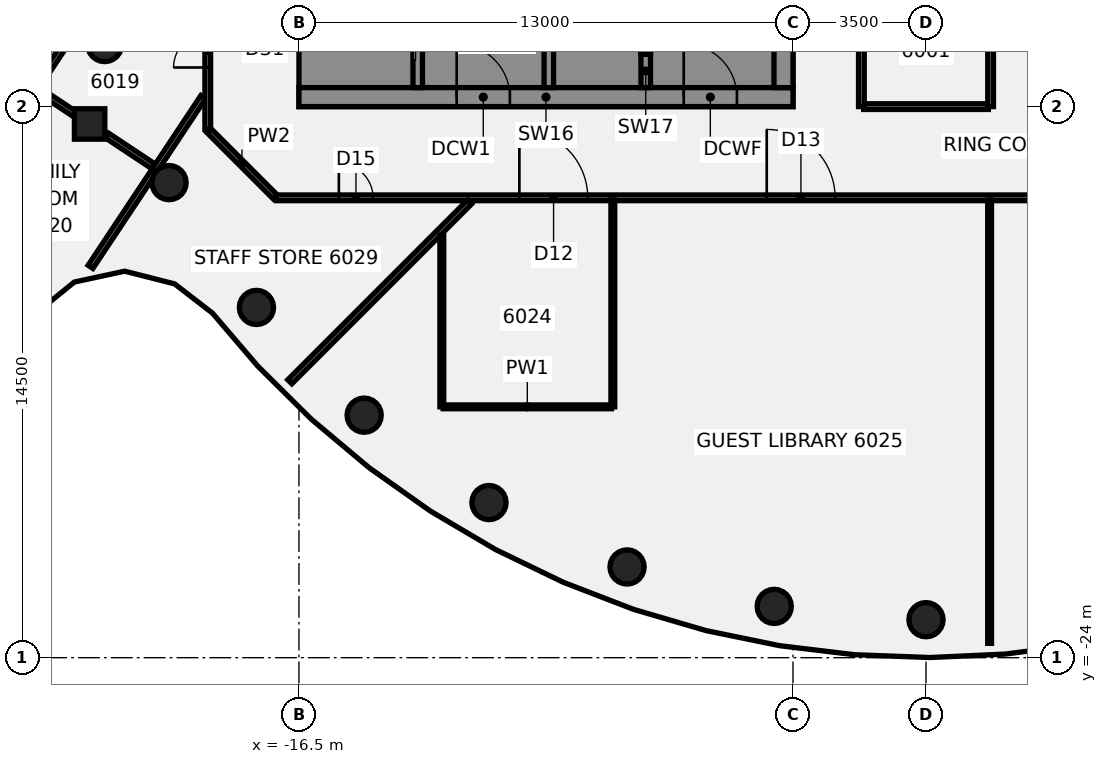
"""IFC4 building model, lengths in metres.
Left out: names, types, materials, properties, quantities, classifications, styles, units other than length and angle.
Written with IfcOpenShell. Run it as: python <this file> out.ifc"""

import sys

from ifc_helpers import new_model, si_unit, direction, frame, frame_2d, origin, origin_2d, place, context, subcontext, project, spatial, polyline, rectangle, circle, outline, extrude, element, fill, save


model = new_model("IFC4")
c1 = context("Model", 3, precision=1e-05, world=origin(), true_north=direction((0.0, 1.0)))
c2 = subcontext(c1, "Body", "Model", "MODEL_VIEW")
j1 = project(units=[si_unit("LENGTHUNIT", "METRE"), si_unit("PLANEANGLEUNIT", "RADIAN")], contexts=[c1])
p1 = place(None, origin())
s1 = spatial("IfcSite", under=j1, at=p1, CompositionType="ELEMENT")
p2 = place(p1, origin())
s2 = spatial("IfcBuilding", under=s1, at=p2, CompositionType="ELEMENT")
p3 = place(p2, frame((0.0, 0.0, 237.9)))
s3 = spatial("IfcBuildingStorey", under=s2, at=p3, CompositionType="ELEMENT", Elevation=237.9)
for number, where, z_axis, x_axis in (
    (1, (-21.613, -7.866, -0.14), (0.0, 0.0, 1.0), (1.0, 0.0, 0.0)),
    (2, (-19.919, -11.5, -0.14), (0.0, 0.0, 1.0), (1.0, 0.0, 0.0)),
    (3, (-17.619, -14.784, -0.14), (0.0, 0.0, 1.0), (1.0, 0.0, 0.0)),
    (4, (-14.784, -17.619, -0.14), (0.0, 0.0, 1.0), (1.0, 0.0, 0.0)),
    (5, (-11.5, -19.919, -0.14), (0.0, 0.0, 1.0), (1.0, 0.0, 0.0)),
    (6, (-7.866, -21.613, -0.14), (0.0, 0.0, 1.0), (1.0, 0.0, 0.0)),
    (7, (-3.994, -22.651, -0.14), (0.0, 0.0, 1.0), (1.0, 0.0, 0.0)),
    (8, (0.0, -23.0, -0.14), (0.0, 0.0, 1.0), (1.0, 0.0, 0.0)),
):
    element("IfcColumn", number, at=place(p3, frame(where, z_axis=z_axis, x_axis=x_axis)), inside=s3, PredefinedType="COLUMN", context=c2, shape_type="SweptSolid", body=[
        extrude(circle(Radius=0.45, at=origin_2d()), origin(), (0.0, 0.0, 1.0), 3.6),
    ])
p4 = place(p3, frame((-22.009, -9.957, -0.139), z_axis=(0.050427781113, 0.000406675654, 0.998727627287), x_axis=(-0.831955767854, 0.553266552151, 0.0417818454)))
e9 = element("IfcColumn", 9, at=p4, inside=s3, PredefinedType="COLUMN", context=c2, shape_type="SweptSolid", body=[
    extrude(rectangle(XDim=0.8, YDim=0.8, at=origin_2d()), origin(), (0.0, 0.0, 1.0), 3.602),
])
p5 = place(p3, frame((-18.872, -10.128, 0.0), z_axis=(0.0, 0.0, 1.0), x_axis=(0.707106781187, -0.707106781187, 0.0)))
e10 = element("IfcWall", 10, at=p5, inside=s3, PredefinedType="PARTITIONING", context=c2, shape_type="SweptSolid", body=[
    extrude(rectangle(XDim=2.465, YDim=0.15, at=frame_2d((1.232, 0.0))), origin(), (0.0, 0.0, 1.0), 2.864),
])
p6 = place(p3, frame((-25.524, -7.623, 0.0), z_axis=(0.0, 0.0, 1.0), x_axis=(0.833112670417, -0.553103316199, 0.0)))
e11 = element("IfcWall", 11, at=p6, inside=s3, PredefinedType="PARTITIONING", context=c2, shape_type="SweptSolid", body=[
    extrude(rectangle(XDim=3.813, YDim=0.15, at=frame_2d((1.906, 0.0))), origin(), (0.0, 0.0, 1.0), 2.864),
])
p7 = place(p3, frame((-21.552, -10.26, 0.0), z_axis=(0.0, 0.0, 1.0), x_axis=(0.833018554475, -0.553245052305, 0.0)))
e12 = element("IfcWall", 12, at=p7, inside=s3, PredefinedType="PARTITIONING", context=c2, shape_type="SweptSolid", body=[
    extrude(rectangle(XDim=1.472, YDim=0.15, at=frame_2d((0.736, 0.0))), origin(), (0.0, 0.0, 1.0), 2.864),
])
p8 = place(p3, frame((-17.1, -11.9, 0.0), z_axis=(0.0, 0.0, 1.0), x_axis=(1.0, 0.0, 0.0)))
e13 = element("IfcWall", 13, at=p8, inside=s3, PredefinedType="PARTITIONING", context=c2, shape_type="SweptSolid", body=[
    extrude(rectangle(XDim=34.165, YDim=0.15, at=frame_2d((17.083, 0.0))), origin(), (0.0, 0.0, 1.0), 2.864),
])
p9 = place(p8, frame((6.4, 0.0, 0.0)))
e14 = element("IfcOpeningElement", 14, at=p9, cuts=e13, PredefinedType="OPENING", context=c2, shape_type="SweptSolid", body=[
    extrude(rectangle(XDim=1.8, YDim=2.1, at=frame_2d((0.9, 1.05))), frame((0.0, 0.085, 0.0), z_axis=(0.0, -1.0, 0.0), x_axis=(1.0, 0.0, 0.0)), (0.0, 0.0, 1.0), 0.17),
])
p10 = place(p8, frame((12.909, 0.0, 0.0)))
e15 = element("IfcOpeningElement", 15, at=p10, cuts=e13, PredefinedType="OPENING", context=c2, shape_type="SweptSolid", body=[
    extrude(rectangle(XDim=1.8, YDim=2.1, at=frame_2d((0.9, 1.05))), frame((0.0, 0.085, 0.0), z_axis=(0.0, -1.0, 0.0), x_axis=(1.0, 0.0, 0.0)), (0.0, 0.0, 1.0), 0.17),
])
p11 = place(p8, frame((22.974, 0.0, 0.0)))
e16 = element("IfcOpeningElement", 16, at=p11, cuts=e13, PredefinedType="OPENING", context=c2, shape_type="SweptSolid", body=[
    extrude(rectangle(XDim=1.8, YDim=2.1, at=frame_2d((0.9, 1.05))), frame((0.0, 0.085, 0.0), z_axis=(0.0, -1.0, 0.0), x_axis=(1.0, 0.0, 0.0)), (0.0, 0.0, 1.0), 0.17),
])
p12 = place(p8, frame((1.65, 0.0, 0.0)))
e17 = element("IfcOpeningElement", 17, at=p12, cuts=e13, PredefinedType="OPENING", context=c2, shape_type="SweptSolid", body=[
    extrude(rectangle(XDim=0.9, YDim=2.1, at=frame_2d((0.45, 1.05))), frame((0.0, 0.085, 0.0), z_axis=(0.0, -1.0, 0.0), x_axis=(1.0, 0.0, 0.0)), (0.0, 0.0, 1.0), 0.17),
])
p13 = place(p3, frame((-12.706, -17.4, 0.0), z_axis=(0.0, 0.0, 1.0), x_axis=(1.0, 0.0, 0.0)))
e18 = element("IfcWall", 18, at=p13, inside=s3, PredefinedType="PARTITIONING", context=c2, shape_type="SweptSolid", body=[
    extrude(rectangle(XDim=4.43, YDim=0.1, at=frame_2d((2.215, 0.0))), origin(), (0.0, 0.0, 1.0), 2.864),
])
p14 = place(p3, frame((-1.64, -9.5, 0.0), z_axis=(0.0, 0.0, 1.0), x_axis=(1.0, 0.0, 0.0)))
e19 = element("IfcWall", 19, at=p14, inside=s3, PredefinedType="PARTITIONING", context=c2, shape_type="SweptSolid", body=[
    extrude(rectangle(XDim=3.28, YDim=0.15, at=frame_2d((1.64, 0.0))), origin(), (0.0, 0.0, 1.0), 2.864),
])
p15 = place(p3, frame((-16.74, -16.74, 0.0), z_axis=(0.0, 0.0, 1.0), x_axis=(0.707106781187, 0.707106781187, 0.0)))
e20 = element("IfcWall", 20, at=p15, inside=s3, PredefinedType="PARTITIONING", context=c2, shape_type="SweptSolid", body=[
    extrude(rectangle(XDim=6.691, YDim=0.15, at=frame_2d((3.345, 0.0))), origin(), (0.0, 0.0, 1.0), 2.864),
])
p16 = place(p3, frame((-24.642, -10.849, 0.0), z_axis=(0.0, 0.0, 1.0), x_axis=(0.553342097608, 0.832954094182, 0.0)))
e21 = element("IfcWall", 21, at=p16, inside=s3, PredefinedType="PARTITIONING", context=c2, shape_type="SweptSolid", body=[
    extrude(rectangle(XDim=4.4, YDim=0.15, at=frame_2d((2.2, 0.0))), origin(), (0.0, 0.0, 1.0), 2.864),
])
p17 = place(p3, frame((-21.985, -13.717, 0.0), z_axis=(0.0, 0.0, 1.0), x_axis=(0.553165057738, 0.833071676927, 0.0)))
e22 = element("IfcWall", 22, at=p17, inside=s3, PredefinedType="PARTITIONING", context=c2, shape_type="SweptSolid", body=[
    extrude(rectangle(XDim=5.362, YDim=0.15, at=frame_2d((2.681, 0.0))), origin(), (0.0, 0.0, 1.0), 2.864),
])
p18 = place(p3, frame((-18.9, -10.1, 0.0), z_axis=(0.0, 0.0, 1.0), x_axis=(0.0, 1.0, 0.0)))
e23 = element("IfcWall", 23, at=p18, inside=s3, PredefinedType="PARTITIONING", context=c2, shape_type="SweptSolid", body=[
    extrude(rectangle(XDim=20.2, YDim=0.15, at=frame_2d((10.1, 0.0))), origin(), (0.0, 0.0, 1.0), 2.864),
])
p19 = place(p18, frame((13.227, 0.0, 0.0)))
e24 = element("IfcOpeningElement", 24, at=p19, cuts=e23, PredefinedType="OPENING", context=c2, shape_type="SweptSolid", body=[
    extrude(rectangle(XDim=1.8, YDim=2.1, at=frame_2d((0.9, 1.05))), frame((0.0, 0.085, 0.0), z_axis=(0.0, -1.0, 0.0), x_axis=(1.0, 0.0, 0.0)), (0.0, 0.0, 1.0), 0.17),
])
p20 = place(p18, frame((7.831, 0.0, 0.0)))
e25 = element("IfcOpeningElement", 25, at=p20, cuts=e23, PredefinedType="OPENING", context=c2, shape_type="SweptSolid", body=[
    extrude(rectangle(XDim=1.8, YDim=2.1, at=frame_2d((0.9, 1.05))), frame((0.0, 0.085, 0.0), z_axis=(0.0, -1.0, 0.0), x_axis=(1.0, 0.0, 0.0)), (0.0, 0.0, 1.0), 0.17),
])
p21 = place(p18, frame((1.629, 0.0, 0.0)))
e26 = element("IfcOpeningElement", 26, at=p21, cuts=e23, PredefinedType="OPENING", context=c2, shape_type="SweptSolid", body=[
    extrude(rectangle(XDim=0.9, YDim=2.1, at=frame_2d((0.45, 1.05))), frame((0.0, 0.085, 0.0), z_axis=(0.0, -1.0, 0.0), x_axis=(1.0, 0.0, 0.0)), (0.0, 0.0, 1.0), 0.17),
])
p22 = place(p3, frame((-12.741, -17.4, 0.0), z_axis=(0.0, 0.0, 1.0), x_axis=(0.0, 1.0, 0.0)))
e27 = element("IfcWall", 27, at=p22, inside=s3, PredefinedType="PARTITIONING", context=c2, shape_type="SweptSolid", body=[
    extrude(rectangle(XDim=4.519, YDim=0.1, at=frame_2d((2.259, 0.0))), origin(), (0.0, 0.0, 1.0), 2.864),
])
p23 = place(p3, frame((-8.241, -17.4, 0.0), z_axis=(0.0, 0.0, 1.0), x_axis=(0.0, 1.0, 0.0)))
e28 = element("IfcWall", 28, at=p23, inside=s3, PredefinedType="PARTITIONING", context=c2, shape_type="SweptSolid", body=[
    extrude(rectangle(XDim=5.445, YDim=0.1, at=frame_2d((2.722, 0.0))), origin(), (0.0, 0.0, 1.0), 2.864),
])
p24 = place(p3, frame((-1.7, -9.5, 0.0), z_axis=(0.0, 0.0, 1.0), x_axis=(0.0, 1.0, 0.0)))
e29 = element("IfcWall", 29, at=p24, inside=s3, PredefinedType="PARTITIONING", context=c2, shape_type="SweptSolid", body=[
    extrude(rectangle(XDim=19.0, YDim=0.15, at=frame_2d((9.5, 0.0))), origin(), (0.0, 0.0, 1.0), 2.864),
])
p25 = place(p24, frame((3.75, 0.0, 0.0)))
e30 = element("IfcOpeningElement", 30, at=p25, cuts=e29, PredefinedType="OPENING", context=c2, shape_type="SweptSolid", body=[
    extrude(rectangle(XDim=1.8, YDim=2.1, at=frame_2d((0.9, 1.05))), frame((0.0, 0.085, 0.0), z_axis=(0.0, -1.0, 0.0), x_axis=(1.0, 0.0, 0.0)), (0.0, 0.0, 1.0), 0.17),
])
p26 = place(p24, frame((10.8, 0.0, 0.0)))
e31 = element("IfcOpeningElement", 31, at=p26, cuts=e29, PredefinedType="OPENING", context=c2, shape_type="SweptSolid", body=[
    extrude(rectangle(XDim=1.8, YDim=2.1, at=frame_2d((0.9, 1.05))), frame((0.0, 0.085, 0.0), z_axis=(0.0, -1.0, 0.0), x_axis=(1.0, 0.0, 0.0)), (0.0, 0.0, 1.0), 0.17),
])
p27 = place(p3, frame((1.674, -23.623, 0.0), z_axis=(0.0, 0.0, 1.0), x_axis=(0.0, 1.0, 0.0)))
e32 = element("IfcWall", 32, at=p27, inside=s3, PredefinedType="PARTITIONING", context=c2, shape_type="SweptSolid", body=[
    extrude(rectangle(XDim=11.668, YDim=0.1, at=frame_2d((5.834, 0.0))), origin(), (0.0, 0.0, 1.0), 2.864),
])
p28 = place(p3, frame((1.7, -9.5, 0.0), z_axis=(0.0, 0.0, 1.0), x_axis=(0.0, 1.0, 0.0)))
e33 = element("IfcWall", 33, at=p28, inside=s3, PredefinedType="PARTITIONING", context=c2, shape_type="SweptSolid", body=[
    extrude(rectangle(XDim=19.0, YDim=0.15, at=frame_2d((9.5, 0.0))), origin(), (0.0, 0.0, 1.0), 2.864),
])
p29 = place(p3, frame((-16.5, -9.25, 0.0), z_axis=(0.0, 0.0, 1.0), x_axis=(1.0, 0.0, 0.0)))
e34 = element("IfcWall", 34, at=p29, inside=s3, PredefinedType="SHEAR", context=c2, shape_type="SweptSolid", body=[
    extrude(rectangle(XDim=13.0, YDim=0.5, at=frame_2d((6.5, 0.0))), origin(), (0.0, 0.0, 1.0), 3.46),
])
p30 = place(p29, frame((4.15, 0.0, 0.0)))
e35 = element("IfcOpeningElement", 35, at=p30, cuts=e34, PredefinedType="OPENING", context=c2, shape_type="SweptSolid", body=[
    extrude(rectangle(XDim=1.4, YDim=2.1, at=frame_2d((0.7, 1.05))), frame((0.0, 0.26, 0.0), z_axis=(0.0, -1.0, 0.0), x_axis=(1.0, 0.0, 0.0)), (0.0, 0.0, 1.0), 0.52),
])
p31 = place(p29, frame((10.125, 0.0, 0.0)))
e36 = element("IfcOpeningElement", 36, at=p31, cuts=e34, PredefinedType="OPENING", context=c2, shape_type="SweptSolid", body=[
    extrude(rectangle(XDim=1.4, YDim=2.1, at=frame_2d((0.7, 1.05))), frame((0.0, 0.26, 0.0), z_axis=(0.0, -1.0, 0.0), x_axis=(1.0, 0.0, 0.0)), (0.0, 0.0, 1.0), 0.52),
])
p32 = place(p3, origin())
e37 = element("IfcWall", 37, at=p32, inside=s3, PredefinedType="SHEAR", context=c2, shape_type="SweptSolid", body=[
    extrude(outline(polyline([(-13.5, -8.125), (-16.0, -8.125), (-16.0, -5.625), (-13.5, -5.625), (-13.5, -5.375), (-16.0, -5.375), (-16.0, 5.375), (-13.5, 5.375), (-13.5, 5.625), (-16.0, 5.625), (-16.0, 8.125), (-13.5, 8.125), (-13.5, 9.0), (-16.0, 9.0), (-16.5, 9.0), (-16.5, -9.0), (-16.0, -9.0), (-13.5, -9.0), (-13.5, -8.125)])), origin(), (0.0, 0.0, 1.0), 3.46),
])
p33 = place(p3, origin())
e38 = element("IfcWall", 38, at=p33, inside=s3, PredefinedType="SHEAR", context=c2, shape_type="SweptSolid", body=[
    extrude(outline(polyline([(-7.5, -8.125), (-9.55, -8.125), (-9.55, -5.625), (-9.8, -5.625), (-9.8, -8.125), (-9.8, -9.0), (-7.5, -9.0), (-7.5, -8.125)])), origin(), (0.0, 0.0, 1.0), 3.46),
])
p34 = place(p3, frame((-7.375, -9.0, 0.0), z_axis=(0.0, 0.0, 1.0), x_axis=(0.0, 1.0, 0.0)))
e39 = element("IfcWall", 39, at=p34, inside=s3, PredefinedType="SHEAR", context=c2, shape_type="SweptSolid", body=[
    extrude(rectangle(XDim=0.875, YDim=0.25, at=frame_2d((0.438, 0.0))), origin(), (0.0, 0.0, 1.0), 3.46),
])
p35 = place(p3, frame((-13.375, -9.0, 0.0), z_axis=(0.0, 0.0, 1.0), x_axis=(0.0, 1.0, 0.0)))
e40 = element("IfcWall", 40, at=p35, inside=s3, PredefinedType="SHEAR", context=c2, shape_type="SweptSolid", body=[
    extrude(rectangle(XDim=18.0, YDim=0.25, at=frame_2d((9.0, 0.0))), origin(), (0.0, 0.0, 1.0), 3.46),
])
p36 = place(p35, frame((1.425, 0.0, 0.0)))
e41 = element("IfcOpeningElement", 41, at=p36, cuts=e40, PredefinedType="OPENING", context=c2, shape_type="SweptSolid", body=[
    extrude(rectangle(XDim=1.4, YDim=2.1, at=frame_2d((0.7, 1.05))), frame((0.0, 0.135, 0.0), z_axis=(0.0, -1.0, 0.0), x_axis=(1.0, 0.0, 0.0)), (0.0, 0.0, 1.0), 0.27),
])
p37 = place(p35, frame((4.854, 0.0, 0.0)))
e42 = element("IfcOpeningElement", 42, at=p37, cuts=e40, PredefinedType="OPENING", context=c2, shape_type="SweptSolid", body=[
    extrude(rectangle(XDim=1.0, YDim=2.1, at=frame_2d((0.5, 1.05))), frame((0.0, 0.135, 0.0), z_axis=(0.0, -1.0, 0.0), x_axis=(1.0, 0.0, 0.0)), (0.0, 0.0, 1.0), 0.27),
])
p38 = place(p35, frame((10.354, 0.0, 0.0)))
e43 = element("IfcOpeningElement", 43, at=p38, cuts=e40, PredefinedType="OPENING", context=c2, shape_type="SweptSolid", body=[
    extrude(rectangle(XDim=1.0, YDim=2.1, at=frame_2d((0.5, 1.05))), frame((0.0, 0.135, 0.0), z_axis=(0.0, -1.0, 0.0), x_axis=(1.0, 0.0, 0.0)), (0.0, 0.0, 1.0), 0.27),
])
p39 = place(p3, frame((-9.925, -9.0, 0.0), z_axis=(0.0, 0.0, 1.0), x_axis=(0.0, 1.0, 0.0)))
e44 = element("IfcWall", 44, at=p39, inside=s3, PredefinedType="SHEAR", context=c2, shape_type="SweptSolid", body=[
    extrude(rectangle(XDim=18.0, YDim=0.25, at=frame_2d((9.0, 0.0))), origin(), (0.0, 0.0, 1.0), 3.46),
])
p40 = place(p39, frame((12.575, 0.0, 0.0)))
e45 = element("IfcOpeningElement", 45, at=p40, cuts=e44, PredefinedType="OPENING", context=c2, shape_type="SweptSolid", body=[
    extrude(rectangle(XDim=1.1, YDim=2.1, at=frame_2d((0.55, 1.05))), frame((0.0, 0.135, 0.0), z_axis=(0.0, -1.0, 0.0), x_axis=(1.0, 0.0, 0.0)), (0.0, 0.0, 1.0), 0.27),
])
p41 = place(p39, frame((15.325, 0.0, 0.0)))
e46 = element("IfcOpeningElement", 46, at=p41, cuts=e44, PredefinedType="OPENING", context=c2, shape_type="SweptSolid", body=[
    extrude(rectangle(XDim=1.1, YDim=2.1, at=frame_2d((0.55, 1.05))), frame((0.0, 0.135, 0.0), z_axis=(0.0, -1.0, 0.0), x_axis=(1.0, 0.0, 0.0)), (0.0, 0.0, 1.0), 0.27),
])
p42 = place(p39, frame((3.938, 0.0, 0.0)))
e47 = element("IfcOpeningElement", 47, at=p42, cuts=e44, PredefinedType="OPENING", context=c2, shape_type="SweptSolid", body=[
    extrude(rectangle(XDim=1.0, YDim=2.1, at=frame_2d((0.5, 1.05))), frame((0.0, 0.135, 0.0), z_axis=(0.0, -1.0, 0.0), x_axis=(1.0, 0.0, 0.0)), (0.0, 0.0, 1.0), 0.27),
])
p43 = place(p39, frame((6.688, 0.0, 0.0)))
e48 = element("IfcOpeningElement", 48, at=p43, cuts=e44, PredefinedType="OPENING", context=c2, shape_type="SweptSolid", body=[
    extrude(rectangle(XDim=1.0, YDim=2.1, at=frame_2d((0.5, 1.05))), frame((0.0, 0.135, 0.0), z_axis=(0.0, -1.0, 0.0), x_axis=(1.0, 0.0, 0.0)), (0.0, 0.0, 1.0), 0.27),
])
p44 = place(p39, frame((9.875, 0.0, 0.0)))
e49 = element("IfcOpeningElement", 49, at=p44, cuts=e44, PredefinedType="OPENING", context=c2, shape_type="SweptSolid", body=[
    extrude(rectangle(XDim=1.0, YDim=2.1, at=frame_2d((0.5, 1.05))), frame((0.0, 0.135, 0.0), z_axis=(0.0, -1.0, 0.0), x_axis=(1.0, 0.0, 0.0)), (0.0, 0.0, 1.0), 0.27),
])
p45 = place(p3, frame((-7.375, -8.125, 0.0), z_axis=(0.0, 0.0, 1.0), x_axis=(0.0, 1.0, 0.0)))
e50 = element("IfcWall", 50, at=p45, inside=s3, PredefinedType="SHEAR", context=c2, shape_type="SweptSolid", body=[
    extrude(rectangle(XDim=2.5, YDim=0.25, at=frame_2d((1.25, 0.0))), origin(), (0.0, 0.0, 1.0), 3.46),
])
p46 = place(p45, frame((0.7, 0.0, 0.0)))
e51 = element("IfcOpeningElement", 51, at=p46, cuts=e50, PredefinedType="OPENING", context=c2, shape_type="SweptSolid", body=[
    extrude(rectangle(XDim=1.1, YDim=2.1, at=frame_2d((0.55, 1.05))), frame((0.0, 0.135, 0.0), z_axis=(0.0, -1.0, 0.0), x_axis=(1.0, 0.0, 0.0)), (0.0, 0.0, 1.0), 0.27),
])
p47 = place(p3, frame((-3.75, -9.0, 0.0), z_axis=(0.0, 0.0, 1.0), x_axis=(0.0, 1.0, 0.0)))
e52 = element("IfcWall", 52, at=p47, inside=s3, PredefinedType="SHEAR", context=c2, shape_type="SweptSolid", body=[
    extrude(rectangle(XDim=18.0, YDim=0.5, at=frame_2d((9.0, 0.0))), origin(), (0.0, 0.0, 1.0), 3.46),
])
p48 = place(p47, frame((1.35, 0.0, 0.0)))
e53 = element("IfcOpeningElement", 53, at=p48, cuts=e52, PredefinedType="OPENING", context=c2, shape_type="SweptSolid", body=[
    extrude(rectangle(XDim=1.8, YDim=2.1, at=frame_2d((0.9, 1.05))), frame((0.0, 0.26, 0.0), z_axis=(0.0, -1.0, 0.0), x_axis=(1.0, 0.0, 0.0)), (0.0, 0.0, 1.0), 0.52),
])
p49 = place(p47, frame((12.75, 0.0, 0.0)))
e54 = element("IfcOpeningElement", 54, at=p49, cuts=e52, PredefinedType="OPENING", context=c2, shape_type="SweptSolid", body=[
    extrude(rectangle(XDim=1.0, YDim=2.1, at=frame_2d((0.5, 1.05))), frame((0.0, 0.26, 0.0), z_axis=(0.0, -1.0, 0.0), x_axis=(1.0, 0.0, 0.0)), (0.0, 0.0, 1.0), 0.52),
])
p50 = place(p47, frame((16.274, 0.0, 0.0)))
e55 = element("IfcOpeningElement", 55, at=p50, cuts=e52, PredefinedType="OPENING", context=c2, shape_type="SweptSolid", body=[
    extrude(rectangle(XDim=1.0, YDim=2.1, at=frame_2d((0.5, 1.05))), frame((0.0, 0.26, 0.0), z_axis=(0.0, -1.0, 0.0), x_axis=(1.0, 0.0, 0.0)), (0.0, 0.0, 1.0), 0.52),
])
p51 = place(p9, frame((1.8, 0.0, 0.0), z_axis=(0.0, 0.0, 1.0), x_axis=(-1.0, 0.0, 0.0)))
e56 = element("IfcDoor", 56, at=p51, inside=s3, OperationType="DOUBLE_DOOR_SINGLE_SWING", PredefinedType="DOOR", context=c2, shape_type="SweptSolid", body=[
    extrude(rectangle(XDim=1.8, YDim=2.1, at=frame_2d((0.9, 1.05))), frame((0.0, 0.025, 0.0), z_axis=(0.0, -1.0, 0.0), x_axis=(1.0, 0.0, 0.0)), (0.0, 0.0, 1.0), 0.05),
])
fill(e14, e56)
p52 = place(p10, frame((1.8, 0.0, 0.0), z_axis=(0.0, 0.0, 1.0), x_axis=(-1.0, 0.0, 0.0)))
e57 = element("IfcDoor", 57, at=p52, inside=s3, OperationType="DOUBLE_DOOR_SINGLE_SWING", PredefinedType="DOOR", context=c2, shape_type="SweptSolid", body=[
    extrude(rectangle(XDim=1.8, YDim=2.1, at=frame_2d((0.9, 1.05))), frame((0.0, 0.025, 0.0), z_axis=(0.0, -1.0, 0.0), x_axis=(1.0, 0.0, 0.0)), (0.0, 0.0, 1.0), 0.05),
])
fill(e15, e57)
p53 = place(p12, frame((0.9, 0.0, 0.0), z_axis=(0.0, 0.0, 1.0), x_axis=(-1.0, 0.0, 0.0)))
e58 = element("IfcDoor", 58, at=p53, inside=s3, OperationType="SINGLE_SWING_LEFT", PredefinedType="DOOR", context=c2, shape_type="SweptSolid", body=[
    extrude(rectangle(XDim=0.9, YDim=2.1, at=frame_2d((0.45, 1.05))), frame((0.0, 0.025, 0.0), z_axis=(0.0, -1.0, 0.0), x_axis=(1.0, 0.0, 0.0)), (0.0, 0.0, 1.0), 0.05),
])
fill(e17, e58)
p54 = place(p21, origin())
e59 = element("IfcDoor", 59, at=p54, inside=s3, OperationType="SINGLE_SWING_RIGHT", PredefinedType="DOOR", context=c2, shape_type="SweptSolid", body=[
    extrude(rectangle(XDim=0.9, YDim=2.1, at=frame_2d((0.45, 1.05))), frame((0.0, 0.025, 0.0), z_axis=(0.0, -1.0, 0.0), x_axis=(1.0, 0.0, 0.0)), (0.0, 0.0, 1.0), 0.05),
])
fill(e26, e59)
p55 = place(p30, origin())
e60 = element("IfcDoor", 60, at=p55, inside=s3, OperationType="SINGLE_SWING_LEFT", PredefinedType="DOOR", context=c2, shape_type="SweptSolid", body=[
    extrude(rectangle(XDim=1.4, YDim=2.1, at=frame_2d((0.7, 1.05))), frame((0.0, 0.025, 0.0), z_axis=(0.0, -1.0, 0.0), x_axis=(1.0, 0.0, 0.0)), (0.0, 0.0, 1.0), 0.05),
])
fill(e35, e60)
p56 = place(p31, origin())
e61 = element("IfcDoor", 61, at=p56, inside=s3, OperationType="SINGLE_SWING_LEFT", PredefinedType="DOOR", context=c2, shape_type="SweptSolid", body=[
    extrude(rectangle(XDim=1.4, YDim=2.1, at=frame_2d((0.7, 1.05))), frame((0.0, 0.025, 0.0), z_axis=(0.0, -1.0, 0.0), x_axis=(1.0, 0.0, 0.0)), (0.0, 0.0, 1.0), 0.05),
])
fill(e36, e61)
save(model, sys.argv[1])
